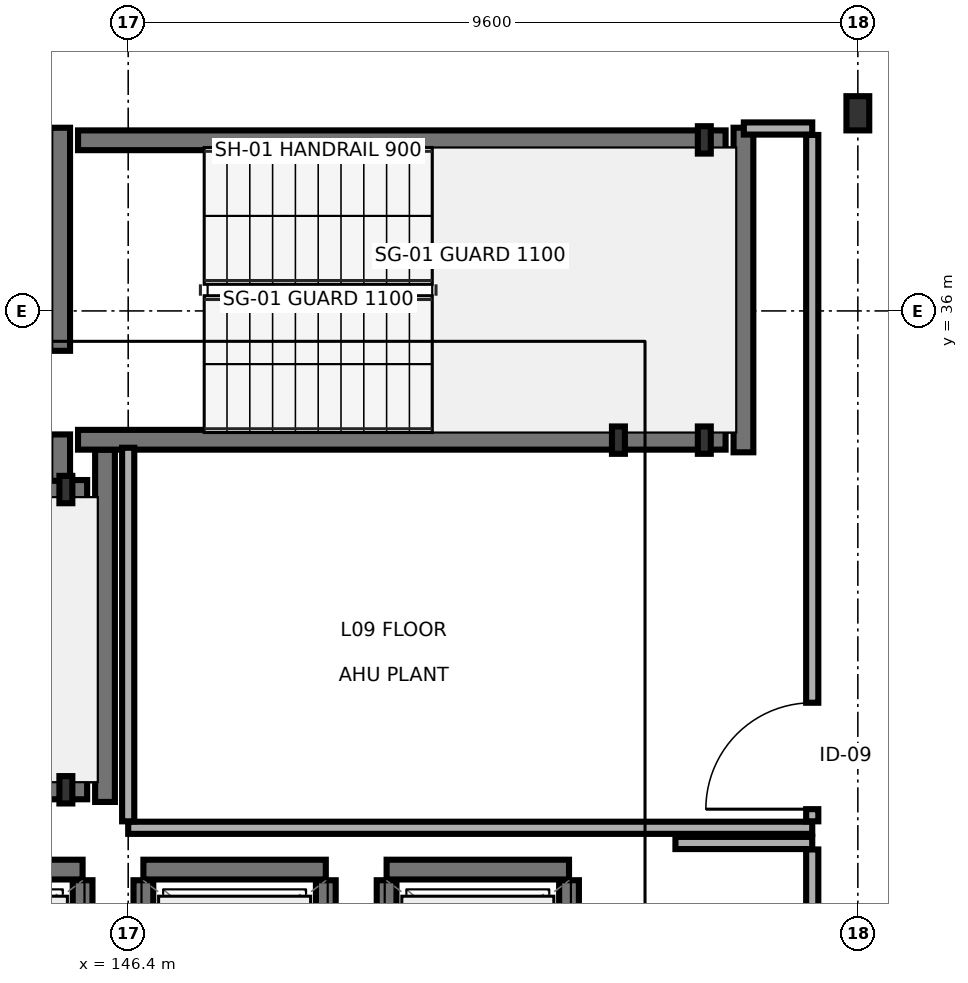
"""IFC4 building model, lengths in metres.
Left out: names, types, materials, properties, quantities, classifications, styles, units other than length and angle.
Written with IfcOpenShell. Run it as: python <this file> out.ifc"""

import sys

from ifc_helpers import new_model, si_unit, direction, frame, frame_2d, origin, origin_2d, place, context, subcontext, project, spatial, rectangle, i_section, extrude, element, fill, save


model = new_model("IFC4")
c1 = context("Model", 3, precision=1e-05, world=origin(), true_north=direction((0.0, 1.0)))
c2 = subcontext(c1, "Body", "Model", "MODEL_VIEW")
j1 = project(units=[si_unit("LENGTHUNIT", "METRE"), si_unit("PLANEANGLEUNIT", "RADIAN")], contexts=[c1])
p1 = place(None, origin())
s1 = spatial("IfcSite", under=j1, at=p1, CompositionType="ELEMENT")
p2 = place(p1, origin())
s2 = spatial("IfcBuilding", under=s1, at=p2, CompositionType="ELEMENT")
p3 = place(p2, frame((0.0, 0.0, 31.7)))
s3 = spatial("IfcBuildingStorey", under=s2, at=p3, CompositionType="ELEMENT", Elevation=31.7)
for number, where, z_axis, x_axis in (
    (1, (145.58, 29.7, 0.0), (0.0, 0.0, 1.0), (1.0, 0.0, 0.0)),
    (2, (145.58, 33.65, 0.0), (0.0, 0.0, 1.0), (1.0, 0.0, 0.0)),
    (3, (152.85, 34.3, 0.0), (0.0, 0.0, 1.0), (1.0, 0.0, 0.0)),
    (4, (153.98, 34.3, 0.0), (0.0, 0.0, 1.0), (1.0, 0.0, 0.0)),
    (5, (153.98, 38.25, 0.0), (0.0, 0.0, 1.0), (1.0, 0.0, 0.0)),
):
    element("IfcColumn", number, at=place(p3, frame(where, z_axis=z_axis, x_axis=x_axis)), inside=s3, PredefinedType="PILASTER", context=c2, shape_type="SweptSolid", body=[
        extrude(i_section(OverallWidth=0.17, OverallDepth=0.36, WebThickness=0.008, FlangeThickness=0.013, FilletRadius=0.018, at=origin_2d()), origin(), (0.0, 0.0, 1.0), 3.4),
    ])
p4 = place(p3, frame((156.0, 38.6, 0.0), z_axis=(0.0, 0.0, 1.0), x_axis=(1.0, 0.0, 0.0)))
e6 = element("IfcColumn", 6, at=p4, inside=s3, PredefinedType="COLUMN", context=c2, shape_type="SweptSolid", body=[
    extrude(i_section(OverallWidth=0.3, OverallDepth=0.45, WebThickness=0.014, FlangeThickness=0.026, FilletRadius=0.027, at=origin_2d()), origin(), (0.0, 0.0, 1.0), 3.4),
])
p5 = place(p3, frame((146.095, 29.54, 0.0), z_axis=(0.0, 0.0, 1.0), x_axis=(0.0, 1.0, 0.0)))
e7 = element("IfcWall", 7, at=p5, inside=s3, PredefinedType="SHEAR", context=c2, shape_type="SweptSolid", body=[
    extrude(rectangle(XDim=4.635, YDim=0.26, at=frame_2d((2.317, 0.0))), origin(), (0.0, 0.0, 1.0), 3.17),
])
for number, where, z_axis, x_axis in (
    (8, (137.34, 29.705, 0.0), (0.0, 0.0, 1.0), (1.0, 0.0, 0.0)),
    (9, (137.34, 33.645, 0.0), (0.0, 0.0, 1.0), (1.0, 0.0, 0.0)),
):
    element("IfcWall", number, at=place(p3, frame(where, z_axis=z_axis, x_axis=x_axis)), inside=s3, PredefinedType="SHEAR", context=c2, shape_type="SweptSolid", body=[
        extrude(rectangle(XDim=8.52, YDim=0.26, at=frame_2d((4.26, 0.0))), origin(), (0.0, 0.0, 1.0), 3.17),
    ])
p6 = place(p3, frame((145.505, 33.765, 0.0), z_axis=(0.0, 0.0, 1.0), x_axis=(0.0, 1.0, 0.0)))
e10 = element("IfcWall", 10, at=p6, inside=s3, PredefinedType="SHEAR", context=c2, shape_type="SweptSolid", body=[
    extrude(rectangle(XDim=4.645, YDim=0.26, at=frame_2d((2.323, 0.0))), origin(), (0.0, 0.0, 1.0), 3.17),
])
p7 = place(p6, frame((0.61, 0.0, 0.0)))
e11 = element("IfcOpeningElement", 11, at=p7, cuts=e10, PredefinedType="OPENING", context=c2, shape_type="SweptSolid", body=[
    extrude(rectangle(XDim=1.1, YDim=2.2, at=frame_2d((0.55, 1.1))), frame((0.0, 0.14, 0.0), z_axis=(0.0, -1.0, 0.0), x_axis=(1.0, 0.0, 0.0)), (0.0, 0.0, 1.0), 0.28),
])
p8 = place(p3, frame((154.495, 34.14, 0.0), z_axis=(0.0, 0.0, 1.0), x_axis=(0.0, 1.0, 0.0)))
e12 = element("IfcWall", 12, at=p8, inside=s3, PredefinedType="SHEAR", context=c2, shape_type="SweptSolid", body=[
    extrude(rectangle(XDim=4.27, YDim=0.26, at=frame_2d((2.135, 0.0))), origin(), (0.0, 0.0, 1.0), 3.17),
])
for number, where, z_axis, x_axis in (
    (13, (145.74, 34.305, 0.0), (0.0, 0.0, 1.0), (1.0, 0.0, 0.0)),
    (14, (145.74, 38.245, 0.0), (0.0, 0.0, 1.0), (1.0, 0.0, 0.0)),
):
    element("IfcWall", number, at=place(p3, frame(where, z_axis=z_axis, x_axis=x_axis)), inside=s3, PredefinedType="SHEAR", context=c2, shape_type="SweptSolid", body=[
        extrude(rectangle(XDim=8.52, YDim=0.26, at=frame_2d((4.26, 0.0))), origin(), (0.0, 0.0, 1.0), 3.17),
    ])
p9 = place(p3, frame((143.4, 28.65, 0.0), z_axis=(0.0, 0.0, 1.0), x_axis=(1.0, 0.0, 0.0)))
e15 = element("IfcWall", 15, at=p9, inside=s3, PredefinedType="SHEAR", context=c2, shape_type="SweptSolid", body=[
    extrude(rectangle(XDim=2.4, YDim=0.26, at=frame_2d((1.2, 0.0))), origin(), (0.0, 0.0, 1.0), 3.17),
])
p10 = place(p3, frame((145.8, 26.69, 0.0), z_axis=(0.0, 0.0, 1.0), x_axis=(0.0, 1.0, 0.0)))
e16 = element("IfcWall", 16, at=p10, inside=s3, PredefinedType="SHEAR", context=c2, shape_type="SweptSolid", body=[
    extrude(rectangle(XDim=1.82, YDim=0.26, at=frame_2d((0.91, 0.0))), origin(), (0.0, 0.0, 1.0), 3.17),
])
p11 = place(p3, frame((146.6, 28.65, 0.0), z_axis=(0.0, 0.0, 1.0), x_axis=(1.0, 0.0, 0.0)))
e17 = element("IfcWall", 17, at=p11, inside=s3, PredefinedType="SHEAR", context=c2, shape_type="SweptSolid", body=[
    extrude(rectangle(XDim=2.4, YDim=0.26, at=frame_2d((1.2, 0.0))), origin(), (0.0, 0.0, 1.0), 3.17),
])
for number, where, z_axis, x_axis in (
    (18, (146.6, 26.69, 0.0), (0.0, 0.0, 1.0), (0.0, 1.0, 0.0)),
    (19, (149.0, 26.69, 0.0), (0.0, 0.0, 1.0), (0.0, 1.0, 0.0)),
):
    element("IfcWall", number, at=place(p3, frame(where, z_axis=z_axis, x_axis=x_axis)), inside=s3, PredefinedType="SHEAR", context=c2, shape_type="SweptSolid", body=[
        extrude(rectangle(XDim=1.82, YDim=0.26, at=frame_2d((0.91, 0.0))), origin(), (0.0, 0.0, 1.0), 3.17),
    ])
p12 = place(p3, frame((149.8, 28.65, 0.0), z_axis=(0.0, 0.0, 1.0), x_axis=(1.0, 0.0, 0.0)))
e20 = element("IfcWall", 20, at=p12, inside=s3, PredefinedType="SHEAR", context=c2, shape_type="SweptSolid", body=[
    extrude(rectangle(XDim=2.4, YDim=0.26, at=frame_2d((1.2, 0.0))), origin(), (0.0, 0.0, 1.0), 3.17),
])
for number, where, z_axis, x_axis in (
    (21, (149.8, 26.69, 0.0), (0.0, 0.0, 1.0), (0.0, 1.0, 0.0)),
    (22, (152.2, 26.69, 0.0), (0.0, 0.0, 1.0), (0.0, 1.0, 0.0)),
):
    element("IfcWall", number, at=place(p3, frame(where, z_axis=z_axis, x_axis=x_axis)), inside=s3, PredefinedType="SHEAR", context=c2, shape_type="SweptSolid", body=[
        extrude(rectangle(XDim=1.82, YDim=0.26, at=frame_2d((0.91, 0.0))), origin(), (0.0, 0.0, 1.0), 3.17),
    ])
p13 = place(p3, frame((146.4, 29.2, 0.0), z_axis=(0.0, 0.0, 1.0), x_axis=(1.0, 0.0, 0.0)))
e23 = element("IfcWall", 23, at=p13, inside=s3, PredefinedType="PARTITIONING", context=c2, shape_type="SweptSolid", body=[
    extrude(rectangle(XDim=9.0, YDim=0.16, at=frame_2d((4.5, 0.0))), origin(), (0.0, 0.0, 1.0), 3.17),
])
p14 = place(p3, frame((146.4, 29.285, 0.0), z_axis=(0.0, 0.0, 1.0), x_axis=(0.0, 1.0, 0.0)))
e24 = element("IfcWall", 24, at=p14, inside=s3, PredefinedType="PARTITIONING", context=c2, shape_type="SweptSolid", body=[
    extrude(rectangle(XDim=4.915, YDim=0.16, at=frame_2d((2.458, 0.0))), origin(), (0.0, 0.0, 1.0), 3.17),
])
p15 = place(p3, frame((154.5, 38.4, 0.0), z_axis=(0.0, 0.0, 1.0), x_axis=(1.0, 0.0, 0.0)))
e25 = element("IfcWall", 25, at=p15, inside=s3, PredefinedType="PARTITIONING", context=c2, shape_type="SweptSolid", body=[
    extrude(rectangle(XDim=0.9, YDim=0.16, at=frame_2d((0.45, 0.0))), origin(), (0.0, 0.0, 1.0), 2.705),
])
p16 = place(p3, frame((155.4, 29.285, 0.0), z_axis=(0.0, 0.0, 1.0), x_axis=(0.0, 1.0, 0.0)))
e26 = element("IfcWall", 26, at=p16, inside=s3, PredefinedType="PARTITIONING", context=c2, shape_type="SweptSolid", body=[
    extrude(rectangle(XDim=9.03, YDim=0.16, at=frame_2d((4.515, 0.0))), origin(), (0.0, 0.0, 1.0), 3.17),
])
p17 = place(p16, frame((0.16, 0.0, 0.0)))
e27 = element("IfcOpeningElement", 27, at=p17, cuts=e26, PredefinedType="OPENING", context=c2, shape_type="SweptSolid", body=[
    extrude(rectangle(XDim=1.4, YDim=2.2, at=frame_2d((0.7, 1.1))), frame((0.0, 0.09, 0.0), z_axis=(0.0, -1.0, 0.0), x_axis=(1.0, 0.0, 0.0)), (0.0, 0.0, 1.0), 0.18),
])
p18 = place(p3, frame((153.6, 29.0, 0.0), z_axis=(0.0, 0.0, 1.0), x_axis=(1.0, 0.0, 0.0)))
e28 = element("IfcWall", 28, at=p18, inside=s3, PredefinedType="PARTITIONING", context=c2, shape_type="SweptSolid", body=[
    extrude(rectangle(XDim=1.8, YDim=0.16, at=frame_2d((0.9, 0.0))), origin(), (0.0, 0.0, 1.0), 3.17),
])
p19 = place(p3, frame((155.4, 16.885, 0.0), z_axis=(0.0, 0.0, 1.0), x_axis=(0.0, 1.0, 0.0)))
e29 = element("IfcWall", 29, at=p19, inside=s3, PredefinedType="PARTITIONING", context=c2, shape_type="SweptSolid", body=[
    extrude(rectangle(XDim=12.03, YDim=0.16, at=frame_2d((6.015, 0.0))), origin(), (0.0, 0.0, 1.0), 2.705),
])
p20 = place(p19, frame((5.365, 0.0, 0.0)))
e30 = element("IfcOpeningElement", 30, at=p20, cuts=e29, PredefinedType="OPENING", context=c2, shape_type="SweptSolid", body=[
    extrude(rectangle(XDim=1.3, YDim=2.2, at=frame_2d((0.65, 1.1))), frame((0.0, 0.09, 0.0), z_axis=(0.0, -1.0, 0.0), x_axis=(1.0, 0.0, 0.0)), (0.0, 0.0, 1.0), 0.18),
])
p21 = place(p7, origin())
e31 = element("IfcDoor", 31, at=p21, inside=s3, OperationType="SINGLE_SWING_RIGHT", PredefinedType="DOOR", context=c2, shape_type="SweptSolid", body=[
    extrude(rectangle(XDim=1.1, YDim=2.2, at=frame_2d((0.55, 1.1))), frame((0.0, 0.025, 0.0), z_axis=(0.0, -1.0, 0.0), x_axis=(1.0, 0.0, 0.0)), (0.0, 0.0, 1.0), 0.05),
])
fill(e11, e31)
p22 = place(p17, origin())
e32 = element("IfcDoor", 32, at=p22, inside=s3, OperationType="SINGLE_SWING_LEFT", PredefinedType="DOOR", context=c2, shape_type="SweptSolid", body=[
    extrude(rectangle(XDim=1.4, YDim=2.2, at=frame_2d((0.7, 1.1))), frame((0.0, 0.025, 0.0), z_axis=(0.0, -1.0, 0.0), x_axis=(1.0, 0.0, 0.0)), (0.0, 0.0, 1.0), 0.05),
])
fill(e27, e32)
save(model, sys.argv[1])
